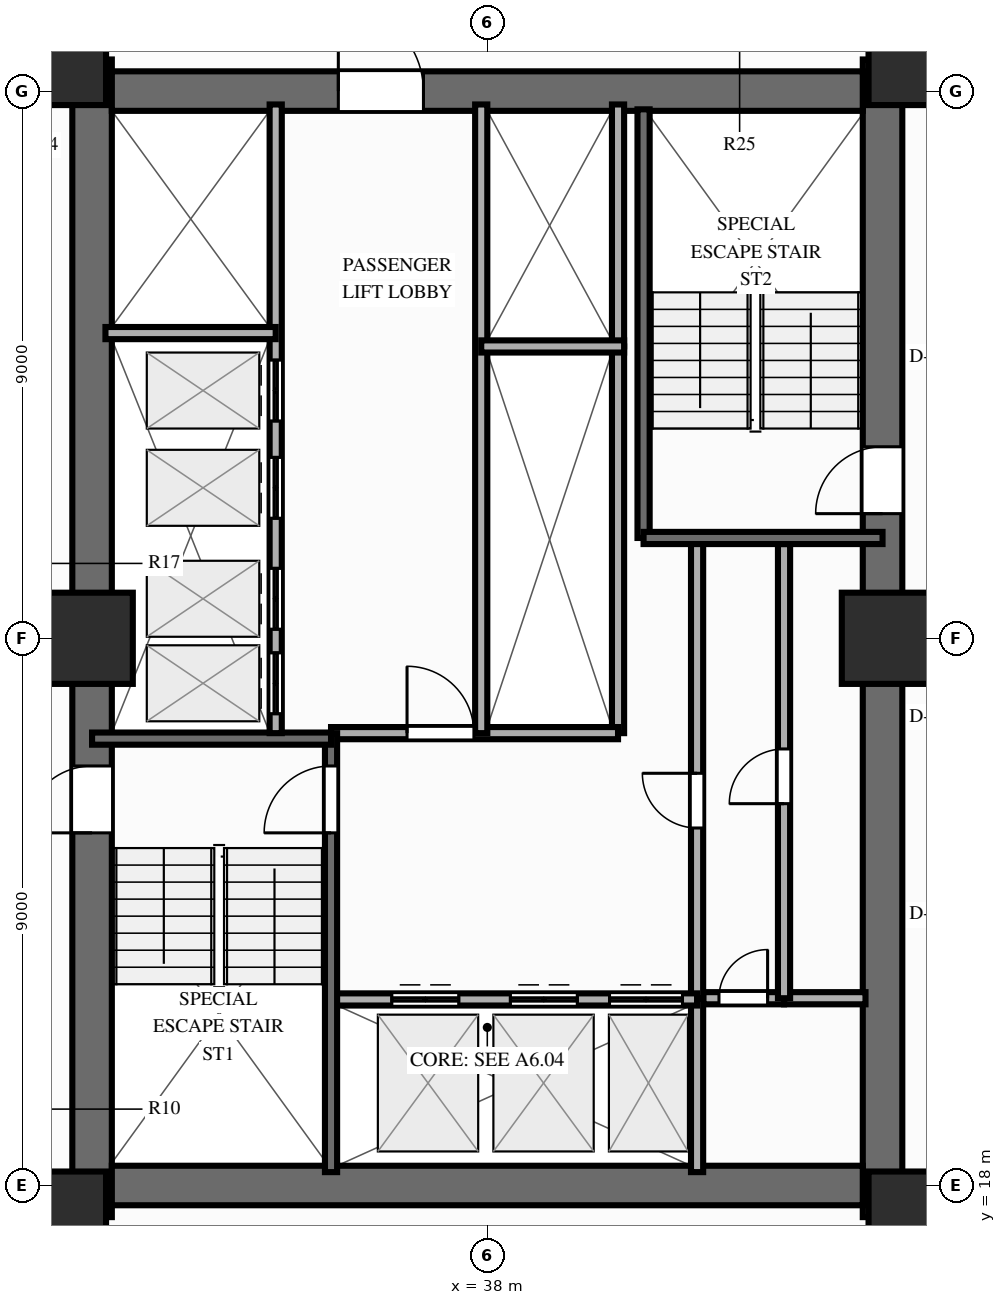
"""IFC4 building model, lengths in metres.
Left out: names, types, materials, properties, quantities, classifications, styles, units other than length and angle.
Written with IfcOpenShell. Run it as: python <this file> out.ifc"""

import sys

from ifc_helpers import new_model, si_unit, direction, frame, frame_2d, origin, origin_2d, place, context, subcontext, project, spatial, rectangle, extrude, source, transform, mapped, element, fill, save


model = new_model("IFC4")
c1 = context("Model", 3, precision=1e-05, world=origin(), true_north=direction((0.0, 1.0)))
c2 = subcontext(c1, "Body", "Model", "MODEL_VIEW")
j1 = project(units=[si_unit("LENGTHUNIT", "METRE"), si_unit("PLANEANGLEUNIT", "RADIAN")], contexts=[c1])
p1 = place(None, origin())
s1 = spatial("IfcSite", under=j1, at=p1, CompositionType="ELEMENT")
p2 = place(p1, origin())
s2 = spatial("IfcBuilding", under=s1, at=p2, CompositionType="ELEMENT")
p3 = place(p2, frame((0.0, 0.0, 43.4)))
s3 = spatial("IfcBuildingStorey", under=s2, at=p3, CompositionType="ELEMENT", Elevation=43.4)
p4 = place(p3, frame((31.5, 17.48, 0.0), z_axis=(0.0, 0.0, 1.0), x_axis=(0.0, 1.0, 0.0)))
e1 = element("IfcWall", 1, at=p4, inside=s3, PredefinedType="SHEAR", context=c2, shape_type="SweptSolid", body=[
    extrude(rectangle(XDim=19.04, YDim=0.65, at=frame_2d((9.52, 0.0))), origin(), (0.0, 0.0, 1.0), 3.0),
])
p5 = place(p4, frame((6.32, 0.0, 0.0)))
e2 = element("IfcOpeningElement", 2, at=p5, cuts=e1, PredefinedType="OPENING", context=c2, shape_type="SweptSolid", body=[
    extrude(rectangle(XDim=1.1, YDim=2.15, at=frame_2d((0.55, 1.075))), frame((0.0, 0.337, 0.0), z_axis=(0.0, -1.0, 0.0), x_axis=(1.0, 0.0, 0.0)), (0.0, 0.0, 1.0), 0.674),
])
p6 = place(p3, frame((44.5, 17.48, 0.0), z_axis=(0.0, 0.0, 1.0), x_axis=(0.0, 1.0, 0.0)))
e3 = element("IfcWall", 3, at=p6, inside=s3, PredefinedType="SHEAR", context=c2, shape_type="SweptSolid", body=[
    extrude(rectangle(XDim=19.04, YDim=0.65, at=frame_2d((9.52, 0.0))), origin(), (0.0, 0.0, 1.0), 3.0),
])
p7 = place(p6, frame((12.67, 0.0, 0.0), z_axis=(0.0, 0.0, 1.0), x_axis=(-1.0, 0.0, 0.0)))
e4 = element("IfcOpeningElement", 4, at=p7, cuts=e3, PredefinedType="OPENING", context=c2, shape_type="SweptSolid", body=[
    extrude(rectangle(XDim=1.1, YDim=2.15, at=frame_2d((0.55, 1.075))), frame((0.0, 0.337, 0.0), z_axis=(0.0, -1.0, 0.0), x_axis=(1.0, 0.0, 0.0)), (0.0, 0.0, 1.0), 0.674),
])
p8 = place(p3, frame((31.825, 18.0, 0.0), z_axis=(0.0, 0.0, 1.0), x_axis=(1.0, 0.0, 0.0)))
e5 = element("IfcWall", 5, at=p8, inside=s3, PredefinedType="SHEAR", context=c2, shape_type="SweptSolid", body=[
    extrude(rectangle(XDim=12.35, YDim=0.65, at=frame_2d((6.175, 0.0))), origin(), (0.0, 0.0, 1.0), 3.0),
])
p9 = place(p3, frame((31.825, 36.0, 0.0), z_axis=(0.0, 0.0, 1.0), x_axis=(1.0, 0.0, 0.0)))
e6 = element("IfcWall", 6, at=p9, inside=s3, PredefinedType="SHEAR", context=c2, shape_type="SweptSolid", body=[
    extrude(rectangle(XDim=12.35, YDim=0.65, at=frame_2d((6.175, 0.0))), origin(), (0.0, 0.0, 1.0), 3.0),
])
p10 = place(p9, frame((5.125, 0.0, 0.0), z_axis=(0.0, 0.0, 1.0), x_axis=(-1.0, 0.0, 0.0)))
e7 = element("IfcOpeningElement", 7, at=p10, cuts=e6, PredefinedType="OPENING", context=c2, shape_type="SweptSolid", body=[
    extrude(rectangle(XDim=1.4, YDim=2.15, at=frame_2d((0.7, 1.075))), frame((0.0, 0.337, 0.0), z_axis=(0.0, -1.0, 0.0), x_axis=(1.0, 0.0, 0.0)), (0.0, 0.0, 1.0), 0.674),
])
m1 = source(origin(), c2, "Body", "SweptSolid", [
    extrude(rectangle(XDim=1.5, YDim=1.5, at=origin_2d()), origin(), (0.0, 0.0, 1.0), 3.0),
])
for number, where, z_axis, x_axis in (
    (8, (30.98, 17.48, 0.0), (0.0, 0.0, 1.0), (1.0, 0.0, 0.0)),
    (9, (45.02, 17.48, 0.0), (0.0, 0.0, 1.0), (1.0, 0.0, 0.0)),
    (10, (30.98, 36.52, 0.0), (0.0, 0.0, 1.0), (1.0, 0.0, 0.0)),
    (11, (45.02, 36.52, 0.0), (0.0, 0.0, 1.0), (1.0, 0.0, 0.0)),
    (12, (31.42, 27.0, 0.0), (0.0, 0.0, 1.0), (1.0, 0.0, 0.0)),
    (13, (44.58, 27.0, 0.0), (0.0, 0.0, 1.0), (1.0, 0.0, 0.0)),
):
    element("IfcColumn", number, at=place(p3, frame(where, z_axis=z_axis, x_axis=x_axis)), inside=s3, PredefinedType="COLUMN", context=c2, shape_type="MappedRepresentation", body=[
        mapped(m1, transform((0.0, 0.0, 0.0), scale=1.0)),
    ])
p11 = place(p3, frame((41.55, 21.08, 0.0), z_axis=(0.0, 0.0, 1.0), x_axis=(1.0, 0.0, 0.0)))
e14 = element("IfcWall", 14, at=p11, inside=s3, PredefinedType="PARTITIONING", context=c2, shape_type="SweptSolid", body=[
    extrude(rectangle(XDim=1.33, YDim=0.2, at=frame_2d((0.665, 0.0))), origin(), (0.0, 0.0, 1.0), 2.79),
])
p12 = place(p11, frame((0.26, 0.0, 0.0)))
e15 = element("IfcOpeningElement", 15, at=p12, cuts=e14, PredefinedType="OPENING", context=c2, shape_type="SweptSolid", body=[
    extrude(rectangle(XDim=0.8, YDim=2.05, at=frame_2d((0.4, 1.025))), frame((0.0, 0.112, 0.0), z_axis=(0.0, -1.0, 0.0), x_axis=(1.0, 0.0, 0.0)), (0.0, 0.0, 1.0), 0.224),
])
p13 = place(p3, frame((42.88, 21.08, 0.0), z_axis=(0.0, 0.0, 1.0), x_axis=(1.0, 0.0, 0.0)))
e16 = element("IfcWall", 16, at=p13, inside=s3, PredefinedType="PARTITIONING", context=c2, shape_type="SweptSolid", body=[
    extrude(rectangle(XDim=1.34, YDim=0.2, at=frame_2d((0.67, 0.0))), origin(), (0.0, 0.0, 1.0), 2.79),
])
p14 = place(p3, frame((42.88, 21.08, 0.0), z_axis=(0.0, 0.0, 1.0), x_axis=(0.0, 1.0, 0.0)))
e17 = element("IfcWall", 17, at=p14, inside=s3, PredefinedType="PARTITIONING", context=c2, shape_type="SweptSolid", body=[
    extrude(rectangle(XDim=7.47, YDim=0.2, at=frame_2d((3.735, 0.0))), origin(), (0.0, 0.0, 1.0), 2.79),
])
p15 = place(p14, frame((3.2, 0.0, 0.0)))
e18 = element("IfcOpeningElement", 18, at=p15, cuts=e17, PredefinedType="OPENING", context=c2, shape_type="SweptSolid", body=[
    extrude(rectangle(XDim=0.9, YDim=2.1, at=frame_2d((0.45, 1.05))), frame((0.0, 0.112, 0.0), z_axis=(0.0, -1.0, 0.0), x_axis=(1.0, 0.0, 0.0)), (0.0, 0.0, 1.0), 0.224),
])
p16 = place(p3, frame((41.45, 18.22, 0.0), z_axis=(0.0, 0.0, 1.0), x_axis=(0.0, 1.0, 0.0)))
e19 = element("IfcWall", 19, at=p16, inside=s3, PredefinedType="PARTITIONING", context=c2, shape_type="SweptSolid", body=[
    extrude(rectangle(XDim=2.86, YDim=0.2, at=frame_2d((1.43, 0.0))), origin(), (0.0, 0.0, 1.0), 2.79),
])
p17 = place(p3, frame((41.45, 21.08, 0.0), z_axis=(0.0, 0.0, 1.0), x_axis=(0.0, 1.0, 0.0)))
e20 = element("IfcWall", 20, at=p17, inside=s3, PredefinedType="PARTITIONING", context=c2, shape_type="SweptSolid", body=[
    extrude(rectangle(XDim=7.52, YDim=0.2, at=frame_2d((3.76, 0.0))), origin(), (0.0, 0.0, 1.0), 2.79),
])
p18 = place(p17, frame((2.8, 0.0, 0.0)))
e21 = element("IfcOpeningElement", 21, at=p18, cuts=e20, PredefinedType="OPENING", context=c2, shape_type="SweptSolid", body=[
    extrude(rectangle(XDim=0.9, YDim=2.1, at=frame_2d((0.45, 1.05))), frame((0.0, 0.112, 0.0), z_axis=(0.0, -1.0, 0.0), x_axis=(1.0, 0.0, 0.0)), (0.0, 0.0, 1.0), 0.224),
])
p19 = place(p3, frame((40.15, 25.44, 0.0), z_axis=(0.0, 0.0, 1.0), x_axis=(0.0, 1.0, 0.0)))
e22 = element("IfcWall", 22, at=p19, inside=s3, PredefinedType="PARTITIONING", context=c2, shape_type="SweptSolid", body=[
    extrude(rectangle(XDim=6.36, YDim=0.2, at=frame_2d((3.18, 0.0))), origin(), (0.0, 0.0, 1.0), 2.79),
])
p20 = place(p3, frame((40.15, 31.8, 0.0), z_axis=(0.0, 0.0, 1.0), x_axis=(0.0, 1.0, 0.0)))
e23 = element("IfcWall", 23, at=p20, inside=s3, PredefinedType="PARTITIONING", context=c2, shape_type="SweptSolid", body=[
    extrude(rectangle(XDim=3.98, YDim=0.2, at=frame_2d((1.99, 0.0))), origin(), (0.0, 0.0, 1.0), 2.79),
])
p21 = place(p3, frame((35.43, 21.06, 0.0), z_axis=(0.0, 0.0, 1.0), x_axis=(1.0, 0.0, 0.0)))
e24 = element("IfcWall", 24, at=p21, inside=s3, PredefinedType="PARTITIONING", context=c2, shape_type="SweptSolid", body=[
    extrude(rectangle(XDim=6.02, YDim=0.2, at=frame_2d((3.01, 0.0))), origin(), (0.0, 0.0, 1.0), 2.79),
])
p22 = place(p21, frame((1.0, 0.0, 0.0)))
e25 = element("IfcOpeningElement", 25, at=p22, cuts=e24, PredefinedType="OPENING", context=c2, shape_type="SweptSolid", body=[
    extrude(rectangle(XDim=1.1, YDim=2.15, at=frame_2d((0.55, 1.075))), frame((0.0, 0.112, 0.0), z_axis=(0.0, -1.0, 0.0), x_axis=(1.0, 0.0, 0.0)), (0.0, 0.0, 1.0), 0.224),
])
p23 = place(p21, frame((2.95, 0.0, 0.0)))
e26 = element("IfcOpeningElement", 26, at=p23, cuts=e24, PredefinedType="OPENING", context=c2, shape_type="SweptSolid", body=[
    extrude(rectangle(XDim=1.1, YDim=2.15, at=frame_2d((0.55, 1.075))), frame((0.0, 0.112, 0.0), z_axis=(0.0, -1.0, 0.0), x_axis=(1.0, 0.0, 0.0)), (0.0, 0.0, 1.0), 0.224),
])
p24 = place(p21, frame((4.58, 0.0, 0.0)))
e27 = element("IfcOpeningElement", 27, at=p24, cuts=e24, PredefinedType="OPENING", context=c2, shape_type="SweptSolid", body=[
    extrude(rectangle(XDim=1.2, YDim=2.15, at=frame_2d((0.6, 1.075))), frame((0.0, 0.112, 0.0), z_axis=(0.0, -1.0, 0.0), x_axis=(1.0, 0.0, 0.0)), (0.0, 0.0, 1.0), 0.224),
])
p25 = place(p3, frame((35.43, 25.44, 0.0), z_axis=(0.0, 0.0, 1.0), x_axis=(1.0, 0.0, 0.0)))
e28 = element("IfcWall", 28, at=p25, inside=s3, PredefinedType="PARTITIONING", context=c2, shape_type="SweptSolid", body=[
    extrude(rectangle(XDim=4.72, YDim=0.2, at=frame_2d((2.36, 0.0))), origin(), (0.0, 0.0, 1.0), 2.79),
])
p26 = place(p25, frame((1.25, 0.0, 0.0)))
e29 = element("IfcOpeningElement", 29, at=p26, cuts=e28, PredefinedType="OPENING", context=c2, shape_type="SweptSolid", body=[
    extrude(rectangle(XDim=1.1, YDim=2.15, at=frame_2d((0.55, 1.075))), frame((0.0, 0.112, 0.0), z_axis=(0.0, -1.0, 0.0), x_axis=(1.0, 0.0, 0.0)), (0.0, 0.0, 1.0), 0.224),
])
p27 = place(p3, frame((35.43, 18.22, 0.0), z_axis=(0.0, 0.0, 1.0), x_axis=(0.0, 1.0, 0.0)))
e30 = element("IfcWall", 30, at=p27, inside=s3, PredefinedType="SOLIDWALL", context=c2, shape_type="SweptSolid", body=[
    extrude(rectangle(XDim=7.22, YDim=0.2, at=frame_2d((3.61, 0.0))), origin(), (0.0, 0.0, 1.0), 2.79),
])
p28 = place(p27, frame((6.68, 0.0, 0.0), z_axis=(0.0, 0.0, 1.0), x_axis=(-1.0, 0.0, 0.0)))
e31 = element("IfcOpeningElement", 31, at=p28, cuts=e30, PredefinedType="OPENING", context=c2, shape_type="SweptSolid", body=[
    extrude(rectangle(XDim=1.1, YDim=2.15, at=frame_2d((0.55, 1.075))), frame((0.0, 0.112, 0.0), z_axis=(0.0, -1.0, 0.0), x_axis=(1.0, 0.0, 0.0)), (0.0, 0.0, 1.0), 0.224),
])
p29 = place(p3, frame((31.5, 25.35, 0.0), z_axis=(0.0, 0.0, 1.0), x_axis=(1.0, 0.0, 0.0)))
e32 = element("IfcWall", 32, at=p29, inside=s3, PredefinedType="SOLIDWALL", context=c2, shape_type="SweptSolid", body=[
    extrude(rectangle(XDim=3.93, YDim=0.2, at=frame_2d((1.965, 0.0))), origin(), (0.0, 0.0, 1.0), 2.79),
])
p30 = place(p3, frame((40.57, 28.65, 0.0), z_axis=(0.0, 0.0, 1.0), x_axis=(0.0, 1.0, 0.0)))
e33 = element("IfcWall", 33, at=p30, inside=s3, PredefinedType="SOLIDWALL", context=c2, shape_type="SweptSolid", body=[
    extrude(rectangle(XDim=7.05, YDim=0.2, at=frame_2d((3.525, 0.0))), origin(), (0.0, 0.0, 1.0), 2.79),
])
p31 = place(p3, frame((40.57, 28.65, 0.0), z_axis=(0.0, 0.0, 1.0), x_axis=(1.0, 0.0, 0.0)))
e34 = element("IfcWall", 34, at=p31, inside=s3, PredefinedType="SOLIDWALL", context=c2, shape_type="SweptSolid", body=[
    extrude(rectangle(XDim=3.93, YDim=0.2, at=frame_2d((1.965, 0.0))), origin(), (0.0, 0.0, 1.0), 2.79),
])
p32 = place(p3, frame((34.52, 25.44, 0.0), z_axis=(0.0, 0.0, 1.0), x_axis=(0.0, 1.0, 0.0)))
e35 = element("IfcWall", 35, at=p32, inside=s3, PredefinedType="PARTITIONING", context=c2, shape_type="SweptSolid", body=[
    extrude(rectangle(XDim=10.34, YDim=0.2, at=frame_2d((5.17, 0.0))), origin(), (0.0, 0.0, 1.0), 2.79),
])
p33 = place(p32, frame((0.32, 0.0, 0.0)))
e36 = element("IfcOpeningElement", 36, at=p33, cuts=e35, PredefinedType="OPENING", context=c2, shape_type="SweptSolid", body=[
    extrude(rectangle(XDim=1.0, YDim=2.15, at=frame_2d((0.5, 1.075))), frame((0.0, 0.112, 0.0), z_axis=(0.0, -1.0, 0.0), x_axis=(1.0, 0.0, 0.0)), (0.0, 0.0, 1.0), 0.224),
])
p34 = place(p32, frame((1.71, 0.0, 0.0)))
e37 = element("IfcOpeningElement", 37, at=p34, cuts=e35, PredefinedType="OPENING", context=c2, shape_type="SweptSolid", body=[
    extrude(rectangle(XDim=1.0, YDim=2.15, at=frame_2d((0.5, 1.075))), frame((0.0, 0.112, 0.0), z_axis=(0.0, -1.0, 0.0), x_axis=(1.0, 0.0, 0.0)), (0.0, 0.0, 1.0), 0.224),
])
p35 = place(p32, frame((3.535, 0.0, 0.0)))
e38 = element("IfcOpeningElement", 38, at=p35, cuts=e35, PredefinedType="OPENING", context=c2, shape_type="SweptSolid", body=[
    extrude(rectangle(XDim=1.0, YDim=2.15, at=frame_2d((0.5, 1.075))), frame((0.0, 0.112, 0.0), z_axis=(0.0, -1.0, 0.0), x_axis=(1.0, 0.0, 0.0)), (0.0, 0.0, 1.0), 0.224),
])
p36 = place(p32, frame((5.135, 0.0, 0.0)))
e39 = element("IfcOpeningElement", 39, at=p36, cuts=e35, PredefinedType="OPENING", context=c2, shape_type="SweptSolid", body=[
    extrude(rectangle(XDim=1.0, YDim=2.15, at=frame_2d((0.5, 1.075))), frame((0.0, 0.112, 0.0), z_axis=(0.0, -1.0, 0.0), x_axis=(1.0, 0.0, 0.0)), (0.0, 0.0, 1.0), 0.224),
])
p37 = place(p3, frame((31.72, 32.02, 0.0), z_axis=(0.0, 0.0, 1.0), x_axis=(1.0, 0.0, 0.0)))
e40 = element("IfcWall", 40, at=p37, inside=s3, PredefinedType="PARTITIONING", context=c2, shape_type="SweptSolid", body=[
    extrude(rectangle(XDim=2.8, YDim=0.2, at=frame_2d((1.4, 0.0))), origin(), (0.0, 0.0, 1.0), 2.79),
])
p38 = place(p3, frame((37.9, 25.44, 0.0), z_axis=(0.0, 0.0, 1.0), x_axis=(0.0, 1.0, 0.0)))
e41 = element("IfcWall", 41, at=p38, inside=s3, PredefinedType="PARTITIONING", context=c2, shape_type="SweptSolid", body=[
    extrude(rectangle(XDim=10.34, YDim=0.2, at=frame_2d((5.17, 0.0))), origin(), (0.0, 0.0, 1.0), 2.79),
])
p39 = place(p3, frame((37.9, 31.8, 0.0), z_axis=(0.0, 0.0, 1.0), x_axis=(1.0, 0.0, 0.0)))
e42 = element("IfcWall", 42, at=p39, inside=s3, PredefinedType="PARTITIONING", context=c2, shape_type="SweptSolid", body=[
    extrude(rectangle(XDim=2.35, YDim=0.2, at=frame_2d((1.175, 0.0))), origin(), (0.0, 0.0, 1.0), 2.79),
])
m2 = source(origin(), c2, "Body", "SweptSolid", [
    extrude(rectangle(XDim=1.1, YDim=2.15, at=frame_2d((0.55, 1.075))), frame((0.0, 0.025, 0.0), z_axis=(0.0, -1.0, 0.0), x_axis=(1.0, 0.0, 0.0)), (0.0, 0.0, 1.0), 0.05),
])
p40 = place(p5, origin())
e43 = element("IfcDoor", 43, at=p40, inside=s3, OperationType="SINGLE_SWING_LEFT", PredefinedType="DOOR", context=c2, shape_type="MappedRepresentation", body=[
    mapped(m2, transform((0.0, 0.0, 0.0), scale=1.0)),
])
fill(e2, e43)
p41 = place(p7, origin())
e44 = element("IfcDoor", 44, at=p41, inside=s3, OperationType="SINGLE_SWING_RIGHT", PredefinedType="DOOR", context=c2, shape_type="MappedRepresentation", body=[
    mapped(m2, transform((0.0, 0.0, 0.0), scale=1.0)),
])
fill(e4, e44)
m3 = source(origin(), c2, "Body", "SweptSolid", [
    extrude(rectangle(XDim=1.4, YDim=2.15, at=frame_2d((0.7, 1.075))), frame((0.0, 0.025, 0.0), z_axis=(0.0, -1.0, 0.0), x_axis=(1.0, 0.0, 0.0)), (0.0, 0.0, 1.0), 0.05),
])
p42 = place(p10, origin())
e45 = element("IfcDoor", 45, at=p42, inside=s3, OperationType="SINGLE_SWING_RIGHT", PredefinedType="DOOR", context=c2, shape_type="MappedRepresentation", body=[
    mapped(m3, transform((0.0, 0.0, 0.0), scale=1.0)),
])
fill(e7, e45)
m4 = source(origin(), c2, "Body", "SweptSolid", [
    extrude(rectangle(XDim=0.8, YDim=2.05, at=frame_2d((0.4, 1.025))), frame((0.0, 0.025, 0.0), z_axis=(0.0, -1.0, 0.0), x_axis=(1.0, 0.0, 0.0)), (0.0, 0.0, 1.0), 0.05),
])
p43 = place(p12, origin())
e46 = element("IfcDoor", 46, at=p43, inside=s3, OperationType="SINGLE_SWING_RIGHT", PredefinedType="DOOR", context=c2, shape_type="MappedRepresentation", body=[
    mapped(m4, transform((0.0, 0.0, 0.0), scale=1.0)),
])
fill(e15, e46)
m5 = source(origin(), c2, "Body", "SweptSolid", [
    extrude(rectangle(XDim=0.9, YDim=2.1, at=frame_2d((0.45, 1.05))), frame((0.0, 0.025, 0.0), z_axis=(0.0, -1.0, 0.0), x_axis=(1.0, 0.0, 0.0)), (0.0, 0.0, 1.0), 0.05),
])
p44 = place(p15, origin())
e47 = element("IfcDoor", 47, at=p44, inside=s3, OperationType="SINGLE_SWING_LEFT", PredefinedType="DOOR", context=c2, shape_type="MappedRepresentation", body=[
    mapped(m5, transform((0.0, 0.0, 0.0), scale=1.0)),
])
fill(e18, e47)
p45 = place(p18, origin())
e48 = element("IfcDoor", 48, at=p45, inside=s3, OperationType="SINGLE_SWING_RIGHT", PredefinedType="DOOR", context=c2, shape_type="MappedRepresentation", body=[
    mapped(m5, transform((0.0, 0.0, 0.0), scale=1.0)),
])
fill(e21, e48)
p46 = place(p22, origin())
e49 = element("IfcDoor", 49, at=p46, inside=s3, OperationType="DOUBLE_DOOR_SLIDING", PredefinedType="DOOR", context=c2, shape_type="MappedRepresentation", body=[
    mapped(m2, transform((0.0, 0.0, 0.0), scale=1.0)),
])
fill(e25, e49)
p47 = place(p23, origin())
e50 = element("IfcDoor", 50, at=p47, inside=s3, OperationType="DOUBLE_DOOR_SLIDING", PredefinedType="DOOR", context=c2, shape_type="MappedRepresentation", body=[
    mapped(m2, transform((0.0, 0.0, 0.0), scale=1.0)),
])
fill(e26, e50)
m6 = source(origin(), c2, "Body", "SweptSolid", [
    extrude(rectangle(XDim=1.2, YDim=2.15, at=frame_2d((0.6, 1.075))), frame((0.0, 0.025, 0.0), z_axis=(0.0, -1.0, 0.0), x_axis=(1.0, 0.0, 0.0)), (0.0, 0.0, 1.0), 0.05),
])
p48 = place(p24, origin())
e51 = element("IfcDoor", 51, at=p48, inside=s3, OperationType="DOUBLE_DOOR_SLIDING", PredefinedType="DOOR", context=c2, shape_type="MappedRepresentation", body=[
    mapped(m6, transform((0.0, 0.0, 0.0), scale=1.0)),
])
fill(e27, e51)
p49 = place(p26, origin())
e52 = element("IfcDoor", 52, at=p49, inside=s3, OperationType="SINGLE_SWING_LEFT", PredefinedType="DOOR", context=c2, shape_type="MappedRepresentation", body=[
    mapped(m2, transform((0.0, 0.0, 0.0), scale=1.0)),
])
fill(e29, e52)
p50 = place(p28, origin())
e53 = element("IfcDoor", 53, at=p50, inside=s3, OperationType="SINGLE_SWING_RIGHT", PredefinedType="DOOR", context=c2, shape_type="MappedRepresentation", body=[
    mapped(m2, transform((0.0, 0.0, 0.0), scale=1.0)),
])
fill(e31, e53)
m7 = source(origin(), c2, "Body", "SweptSolid", [
    extrude(rectangle(XDim=1.0, YDim=2.15, at=frame_2d((0.5, 1.075))), frame((0.0, 0.025, 0.0), z_axis=(0.0, -1.0, 0.0), x_axis=(1.0, 0.0, 0.0)), (0.0, 0.0, 1.0), 0.05),
])
p51 = place(p33, origin())
e54 = element("IfcDoor", 54, at=p51, inside=s3, OperationType="DOUBLE_DOOR_SLIDING", PredefinedType="DOOR", context=c2, shape_type="MappedRepresentation", body=[
    mapped(m7, transform((0.0, 0.0, 0.0), scale=1.0)),
])
fill(e36, e54)
p52 = place(p34, origin())
e55 = element("IfcDoor", 55, at=p52, inside=s3, OperationType="DOUBLE_DOOR_SLIDING", PredefinedType="DOOR", context=c2, shape_type="MappedRepresentation", body=[
    mapped(m7, transform((0.0, 0.0, 0.0), scale=1.0)),
])
fill(e37, e55)
p53 = place(p35, origin())
e56 = element("IfcDoor", 56, at=p53, inside=s3, OperationType="DOUBLE_DOOR_SLIDING", PredefinedType="DOOR", context=c2, shape_type="MappedRepresentation", body=[
    mapped(m7, transform((0.0, 0.0, 0.0), scale=1.0)),
])
fill(e38, e56)
p54 = place(p36, origin())
e57 = element("IfcDoor", 57, at=p54, inside=s3, OperationType="DOUBLE_DOOR_SLIDING", PredefinedType="DOOR", context=c2, shape_type="MappedRepresentation", body=[
    mapped(m7, transform((0.0, 0.0, 0.0), scale=1.0)),
])
fill(e39, e57)
save(model, sys.argv[1])
